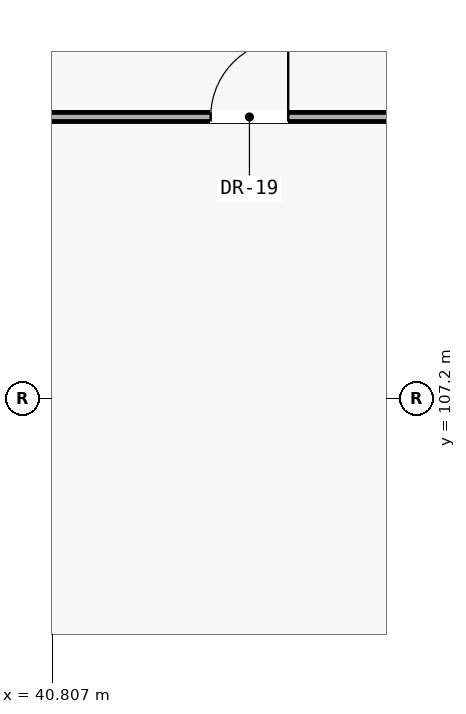
"""IFC4 building model, lengths in metres.
Left out: names, types, materials, properties, quantities, classifications, styles, units other than length and angle.
Written with IfcOpenShell. Run it as: python <this file> out.ifc"""

import sys

from ifc_helpers import new_model, si_unit, direction, frame, frame_2d, origin, place, context, subcontext, project, spatial, rectangle, extrude, element, fill, save


model = new_model("IFC4")
c1 = context("Model", 3, precision=1e-05, world=origin(), true_north=direction((0.0, 1.0)))
c2 = subcontext(c1, "Body", "Model", "MODEL_VIEW")
j1 = project(units=[si_unit("LENGTHUNIT", "METRE"), si_unit("PLANEANGLEUNIT", "RADIAN")], contexts=[c1])
p1 = place(None, origin())
s1 = spatial("IfcSite", under=j1, at=p1, CompositionType="ELEMENT")
p2 = place(p1, origin())
s2 = spatial("IfcBuilding", under=s1, at=p2, CompositionType="ELEMENT")
p3 = place(p2, frame((0.0, 0.0, 5.25)))
s3 = spatial("IfcBuildingStorey", under=s2, at=p3, CompositionType="ELEMENT", Elevation=5.25)
p4 = place(p3, frame((29.2, 110.9, 0.0), z_axis=(0.0, 0.0, 1.0), x_axis=(1.0, 0.0, 0.0)))
e1 = element("IfcWall", 1, at=p4, inside=s3, PredefinedType="PARTITIONING", context=c2, shape_type="SweptSolid", body=[
    extrude(rectangle(XDim=28.4, YDim=0.12, at=frame_2d((14.2, 0.0))), origin(), (0.0, 0.0, 1.0), 3.96),
])
p5 = place(p4, frame((13.69, 0.0, 0.0)))
e2 = element("IfcOpeningElement", 2, at=p5, cuts=e1, PredefinedType="OPENING", context=c2, shape_type="SweptSolid", body=[
    extrude(rectangle(XDim=1.02, YDim=2.1, at=frame_2d((0.51, 1.05))), frame((0.0, 0.07, 0.0), z_axis=(0.0, -1.0, 0.0), x_axis=(1.0, 0.0, 0.0)), (0.0, 0.0, 1.0), 0.14),
])
p6 = place(p5, origin())
e3 = element("IfcDoor", 3, at=p6, inside=s3, OperationType="SINGLE_SWING_RIGHT", PredefinedType="DOOR", context=c2, shape_type="SweptSolid", body=[
    extrude(rectangle(XDim=1.02, YDim=2.1, at=frame_2d((0.51, 1.05))), frame((0.0, 0.025, 0.0), z_axis=(0.0, -1.0, 0.0), x_axis=(1.0, 0.0, 0.0)), (0.0, 0.0, 1.0), 0.05),
])
fill(e2, e3)
save(model, sys.argv[1])
